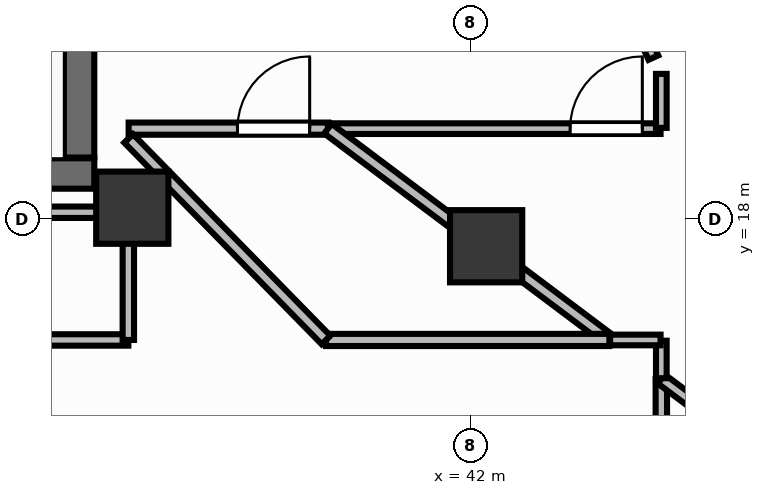
"""IFC4 building model, lengths in metres.
Left out: names, types, materials, properties, quantities, classifications, styles, units other than length and angle.
Written with IfcOpenShell. Run it as: python <this file> out.ifc"""

import sys

from ifc_helpers import new_model, si_unit, direction, frame, frame_2d, origin, origin_2d, place, context, subcontext, project, spatial, rectangle, extrude, element, fill, save


model = new_model("IFC4")
c1 = context("Model", 3, precision=1e-05, world=origin(), true_north=direction((0.0, 1.0)))
c2 = subcontext(c1, "Body", "Model", "MODEL_VIEW")
j1 = project(units=[si_unit("LENGTHUNIT", "METRE"), si_unit("PLANEANGLEUNIT", "RADIAN")], contexts=[c1])
p1 = place(None, origin())
s1 = spatial("IfcSite", under=j1, at=p1, CompositionType="ELEMENT")
p2 = place(p1, origin())
s2 = spatial("IfcBuilding", under=s1, at=p2, CompositionType="ELEMENT")
p3 = place(p2, frame((0.0, 0.0, 252.0)))
s3 = spatial("IfcBuildingStorey", under=s2, at=p3, CompositionType="ELEMENT", Elevation=252.0)
p4 = place(p3, frame((28.852, 18.6, 0.0), z_axis=(0.0, 0.0, 1.0), x_axis=(1.0, 0.0, 0.0)))
e1 = element("IfcWall", 1, at=p4, inside=s3, PredefinedType="SHEAR", context=c2, shape_type="SweptSolid", body=[
    extrude(rectangle(XDim=8.198, YDim=0.4, at=frame_2d((4.099, 0.0))), origin(), (0.0, 0.0, 1.0), 3.9),
])
p5 = place(p3, frame((36.85, 18.81, 0.0), z_axis=(0.0, 0.0, 1.0), x_axis=(0.0, 1.0, 0.0)))
e2 = element("IfcWall", 2, at=p5, inside=s3, PredefinedType="SHEAR", context=c2, shape_type="SweptSolid", body=[
    extrude(rectangle(XDim=3.08, YDim=0.4, at=frame_2d((1.54, 0.0))), origin(), (0.0, 0.0, 1.0), 3.9),
])
p6 = place(p3, frame((37.55, 18.15, -0.0), z_axis=(0.0, 0.0, 1.0), x_axis=(1.0, 0.0, 0.0)))
e3 = element("IfcColumn", 3, at=p6, inside=s3, PredefinedType="PILASTER", context=c2, shape_type="SweptSolid", body=[
    extrude(rectangle(XDim=0.95, YDim=0.95, at=origin_2d()), origin(), (0.0, 0.0, 1.0), 3.901),
])
p7 = place(p3, frame((42.205, 17.643, -0.0), z_axis=(0.0, 0.0, 1.0), x_axis=(1.0, 0.0, 0.0)))
e4 = element("IfcColumn", 4, at=p7, inside=s3, PredefinedType="COLUMN", context=c2, shape_type="SweptSolid", body=[
    extrude(rectangle(XDim=0.95, YDim=0.95, at=origin_2d()), origin(), (0.0, 0.0, 1.0), 3.901),
])
p8 = place(p3, frame((37.498, 16.41, 0.0), z_axis=(0.0, 0.0, 1.0), x_axis=(-1.0, 0.0, 0.0)))
e5 = element("IfcWall", 5, at=p8, inside=s3, PredefinedType="PARTITIONING", context=c2, shape_type="SweptSolid", body=[
    extrude(rectangle(XDim=4.038, YDim=0.15, at=frame_2d((2.019, 0.0))), origin(), (0.0, 0.0, 1.0), 2.91),
])
p9 = place(p8, frame((2.848, 0.0, 0.0)))
e6 = element("IfcOpeningElement", 6, at=p9, cuts=e5, PredefinedType="OPENING", context=c2, shape_type="SweptSolid", body=[
    extrude(rectangle(XDim=0.95, YDim=2.15, at=frame_2d((0.475, 1.075))), frame((0.0, 0.09, 0.0), z_axis=(0.0, -1.0, 0.0), x_axis=(1.0, 0.0, 0.0)), (0.0, 0.0, 1.0), 0.18),
])
p10 = place(p3, frame((37.502, 19.19, 0.0), z_axis=(0.0, 0.0, 1.0), x_axis=(1.0, 0.0, 0.0)))
e7 = element("IfcWall", 7, at=p10, inside=s3, PredefinedType="PARTITIONING", context=c2, shape_type="SweptSolid", body=[
    extrude(rectangle(XDim=2.622, YDim=0.16, at=frame_2d((1.311, 0.0))), origin(), (0.0, 0.0, 1.0), 2.91),
])
p11 = place(p10, frame((1.432, 0.0, 0.0)))
e8 = element("IfcOpeningElement", 8, at=p11, cuts=e7, PredefinedType="OPENING", context=c2, shape_type="SweptSolid", body=[
    extrude(rectangle(XDim=0.95, YDim=2.15, at=frame_2d((0.475, 1.075))), frame((0.0, 0.095, 0.0), z_axis=(0.0, -1.0, 0.0), x_axis=(1.0, 0.0, 0.0)), (0.0, 0.0, 1.0), 0.19),
])
p12 = place(p3, frame((44.51, 12.6, 0.0), z_axis=(0.0, 0.0, 1.0), x_axis=(0.0, 1.0, 0.0)))
e9 = element("IfcWall", 9, at=p12, inside=s3, PredefinedType="PARTITIONING", context=c2, shape_type="SweptSolid", body=[
    extrude(rectangle(XDim=3.297, YDim=0.15, at=frame_2d((1.648, 0.0))), origin(), (0.0, 0.0, 1.0), 2.91),
])
p13 = place(p12, frame((0.24, 0.0, 0.0)))
e10 = element("IfcOpeningElement", 10, at=p13, cuts=e9, PredefinedType="OPENING", context=c2, shape_type="SweptSolid", body=[
    extrude(rectangle(XDim=0.95, YDim=2.15, at=frame_2d((0.475, 1.075))), frame((0.0, 0.09, 0.0), z_axis=(0.0, -1.0, 0.0), x_axis=(1.0, 0.0, 0.0)), (0.0, 0.0, 1.0), 0.18),
])
p14 = place(p3, frame((40.14, 19.19, 0.0), z_axis=(0.0, 0.0, 1.0), x_axis=(1.0, 0.0, 0.0)))
e11 = element("IfcWall", 11, at=p14, inside=s3, PredefinedType="PARTITIONING", context=c2, shape_type="SweptSolid", body=[
    extrude(rectangle(XDim=4.36, YDim=0.14, at=frame_2d((2.18, 0.0))), origin(), (0.0, 0.0, 1.0), 2.91),
])
p15 = place(p14, frame((3.17, 0.0, 0.0)))
e12 = element("IfcOpeningElement", 12, at=p15, cuts=e11, PredefinedType="OPENING", context=c2, shape_type="SweptSolid", body=[
    extrude(rectangle(XDim=0.95, YDim=2.15, at=frame_2d((0.475, 1.075))), frame((0.0, 0.085, 0.0), z_axis=(0.0, -1.0, 0.0), x_axis=(1.0, 0.0, 0.0)), (0.0, 0.0, 1.0), 0.17),
])
p16 = place(p3, frame((37.498, 18.364, 0.0), z_axis=(0.0, 0.0, 1.0), x_axis=(0.0, -1.0, 0.0)))
e13 = element("IfcWall", 13, at=p16, inside=s3, PredefinedType="PARTITIONING", context=c2, shape_type="SweptSolid", body=[
    extrude(rectangle(XDim=1.954, YDim=0.15, at=frame_2d((0.977, 0.0))), origin(), (0.0, 0.0, 1.0), 2.91),
])
p17 = place(p3, frame((33.46, 18.09, 0.0), z_axis=(0.0, 0.0, 1.0), x_axis=(1.0, 0.0, 0.0)))
e14 = element("IfcWall", 14, at=p17, inside=s3, PredefinedType="PARTITIONING", context=c2, shape_type="SweptSolid", body=[
    extrude(rectangle(XDim=3.89, YDim=0.15, at=frame_2d((1.945, 0.0))), origin(), (0.0, 0.0, 1.0), 2.91),
])
p18 = place(p3, frame((40.124, 19.19, 0.0), z_axis=(0.0, 0.0, 1.0), x_axis=(0.799683516567, -0.600421746218, 0.0)))
e15 = element("IfcWall", 15, at=p18, inside=s3, PredefinedType="PARTITIONING", context=c2, shape_type="SweptSolid", body=[
    extrude(rectangle(XDim=4.63, YDim=0.16, at=frame_2d((2.315, 0.0))), origin(), (0.0, 0.0, 1.0), 2.91),
])
p19 = place(p3, frame((43.826, 16.41, 0.0), z_axis=(0.0, 0.0, 1.0), x_axis=(-1.0, 0.0, 0.0)))
e16 = element("IfcWall", 16, at=p19, inside=s3, PredefinedType="PARTITIONING", context=c2, shape_type="SweptSolid", body=[
    extrude(rectangle(XDim=3.728, YDim=0.16, at=frame_2d((1.864, 0.0))), origin(), (0.0, 0.0, 1.0), 2.91),
])
p20 = place(p3, frame((40.098, 16.41, 0.0), z_axis=(0.0, 0.0, 1.0), x_axis=(-0.69966677512, 0.714469316201, 0.0)))
e17 = element("IfcWall", 17, at=p20, inside=s3, PredefinedType="PARTITIONING", context=c2, shape_type="SweptSolid", body=[
    extrude(rectangle(XDim=3.711, YDim=0.16, at=frame_2d((1.855, 0.0))), origin(), (0.0, 0.0, 1.0), 2.91),
])
p21 = place(p3, frame((44.51, 15.897, 0.0), z_axis=(0.0, 0.0, 1.0), x_axis=(0.79968453469, -0.600420390209, 0.0)))
e18 = element("IfcWall", 18, at=p21, inside=s3, PredefinedType="PARTITIONING", context=c2, shape_type="SweptSolid", body=[
    extrude(rectangle(XDim=9.011, YDim=0.15, at=frame_2d((4.506, 0.0))), origin(), (0.0, 0.0, 1.0), 2.91),
])
p22 = place(p3, frame((44.51, 15.907, 0.0), z_axis=(0.0, 0.0, 1.0), x_axis=(0.0, 1.0, 0.0)))
e19 = element("IfcWall", 19, at=p22, inside=s3, PredefinedType="PARTITIONING", context=c2, shape_type="SweptSolid", body=[
    extrude(rectangle(XDim=0.493, YDim=0.14, at=frame_2d((0.247, 0.0))), origin(), (0.0, 0.0, 1.0), 2.91),
])
p23 = place(p3, frame((44.5, 16.41, 0.0), z_axis=(0.0, 0.0, 1.0), x_axis=(-1.0, 0.0, 0.0)))
e20 = element("IfcWall", 20, at=p23, inside=s3, PredefinedType="PARTITIONING", context=c2, shape_type="SweptSolid", body=[
    extrude(rectangle(XDim=0.664, YDim=0.14, at=frame_2d((0.332, 0.0))), origin(), (0.0, 0.0, 1.0), 2.91),
])
p24 = place(p3, frame((44.51, 19.2, 0.0), z_axis=(0.0, 0.0, 1.0), x_axis=(0.0, 1.0, 0.0)))
e21 = element("IfcWall", 21, at=p24, inside=s3, PredefinedType="PARTITIONING", context=c2, shape_type="SweptSolid", body=[
    extrude(rectangle(XDim=0.71, YDim=0.14, at=frame_2d((0.355, 0.0))), origin(), (0.0, 0.0, 1.0), 2.91),
])
p25 = place(p3, frame((44.406, 20.124, 0.0), z_axis=(0.0, 0.0, 1.0), x_axis=(-0.414730972931, 0.909944075255, 0.0)))
e22 = element("IfcWall", 22, at=p25, inside=s3, PredefinedType="PARTITIONING", context=c2, shape_type="SweptSolid", body=[
    extrude(rectangle(XDim=1.526, YDim=0.14, at=frame_2d((0.763, 0.0))), origin(), (0.0, 0.0, 1.0), 2.91),
])
p26 = place(p11, origin())
e23 = element("IfcDoor", 23, at=p26, inside=s3, OperationType="SINGLE_SWING_RIGHT", PredefinedType="DOOR", context=c2, shape_type="SweptSolid", body=[
    extrude(rectangle(XDim=0.95, YDim=2.15, at=frame_2d((0.475, 1.075))), frame((0.0, 0.025, 0.0), z_axis=(0.0, -1.0, 0.0), x_axis=(1.0, 0.0, 0.0)), (0.0, 0.0, 1.0), 0.05),
])
fill(e8, e23)
p27 = place(p15, origin())
e24 = element("IfcDoor", 24, at=p27, inside=s3, OperationType="SINGLE_SWING_RIGHT", PredefinedType="DOOR", context=c2, shape_type="SweptSolid", body=[
    extrude(rectangle(XDim=0.95, YDim=2.15, at=frame_2d((0.475, 1.075))), frame((0.0, 0.025, 0.0), z_axis=(0.0, -1.0, 0.0), x_axis=(1.0, 0.0, 0.0)), (0.0, 0.0, 1.0), 0.05),
])
fill(e12, e24)
save(model, sys.argv[1])
